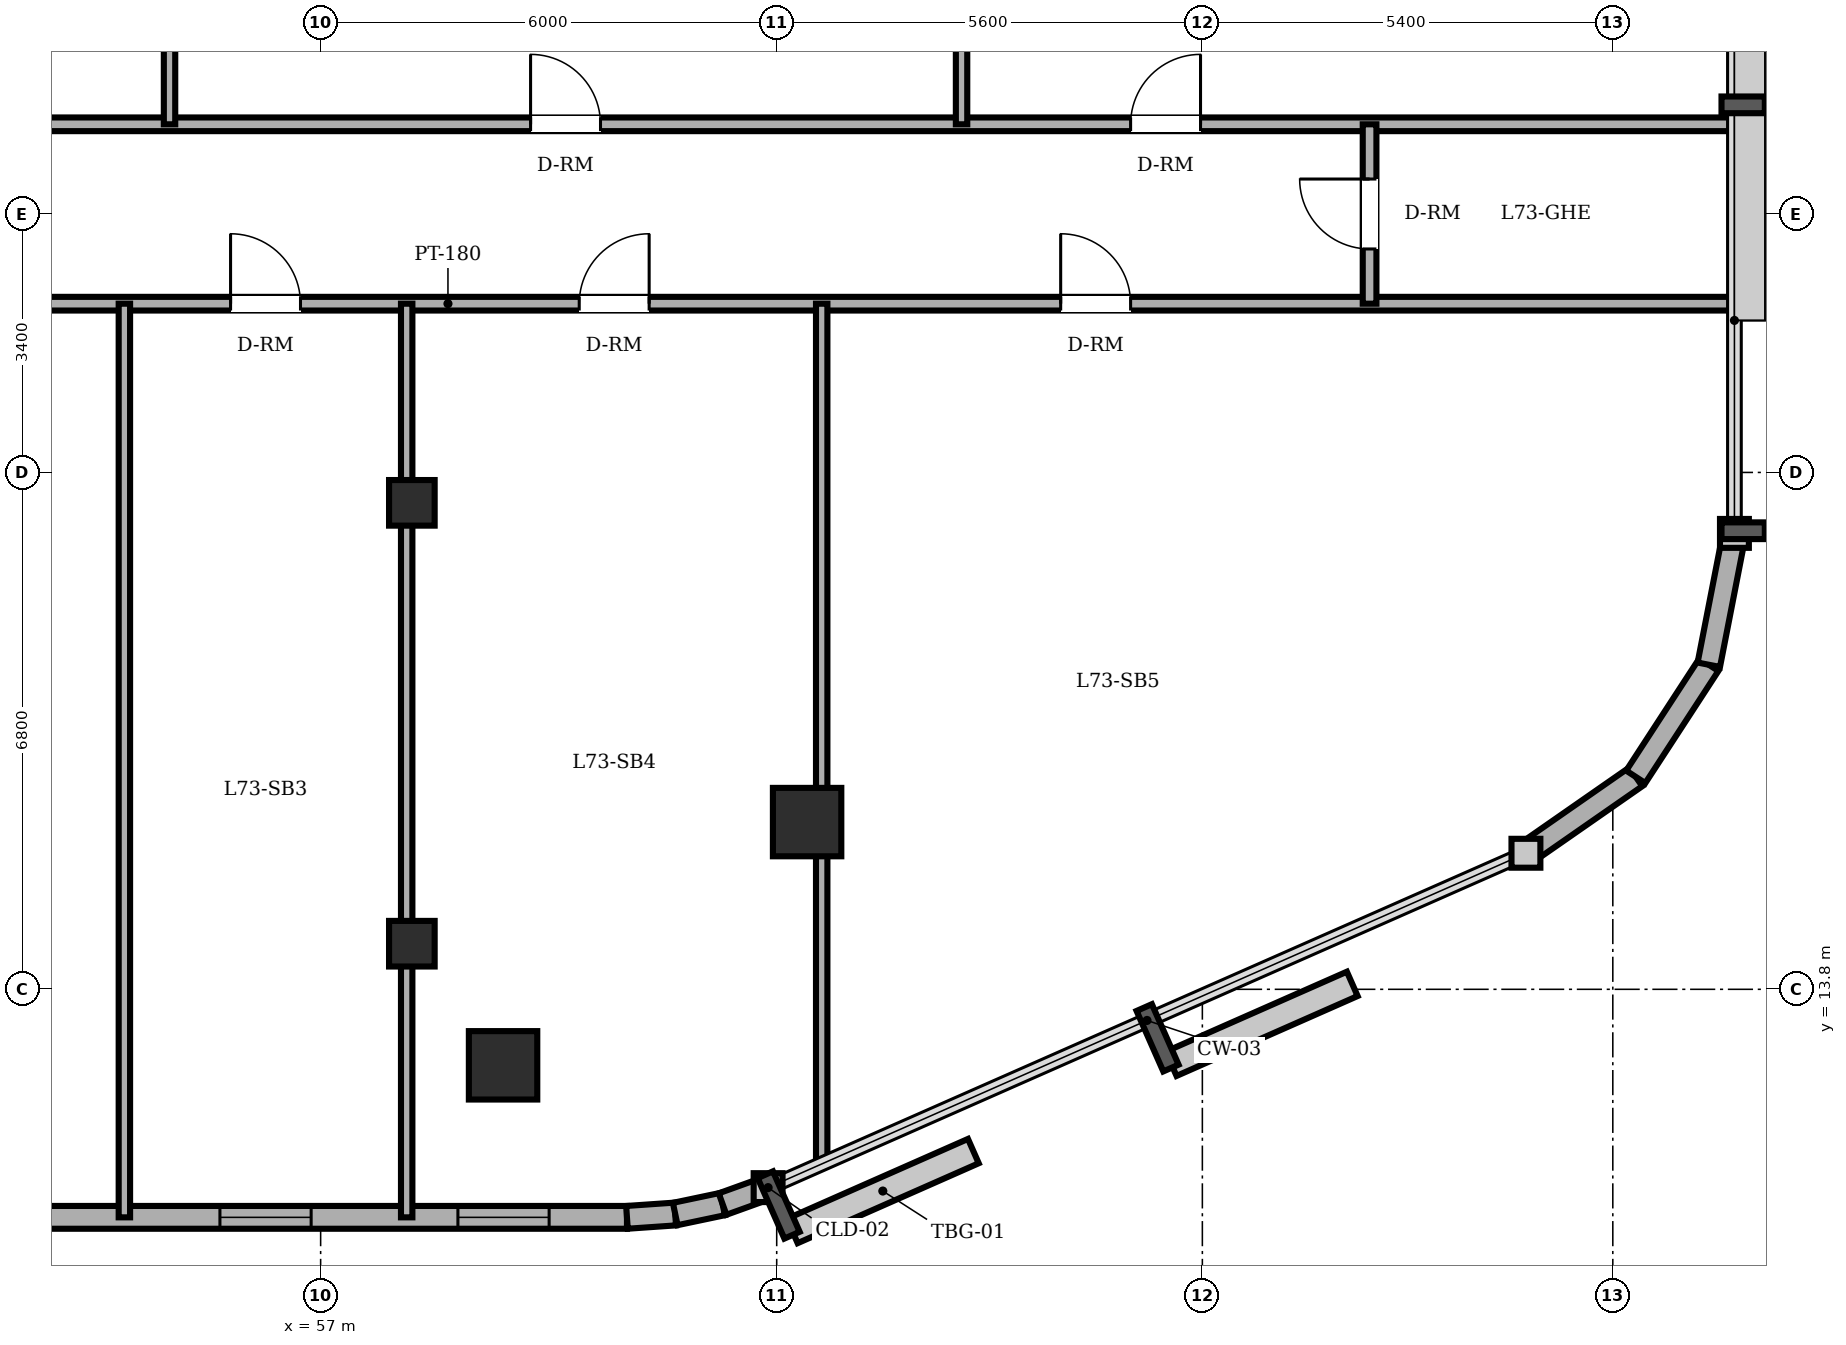
"""IFC4 building model, lengths in metres.
Left out: names, types, materials, properties, quantities, classifications, styles, units other than length and angle.
Written with IfcOpenShell. Run it as: python <this file> out.ifc"""

import sys

from ifc_helpers import new_model, si_unit, direction, frame, frame_2d, origin, origin_2d, place, context, subcontext, project, spatial, rectangle, circle, extrude, element, fill, save


model = new_model("IFC4")
c1 = context("Model", 3, precision=1e-05, world=origin(), true_north=direction((0.0, 1.0)))
c2 = subcontext(c1, "Body", "Model", "MODEL_VIEW")
j1 = project(units=[si_unit("LENGTHUNIT", "METRE"), si_unit("PLANEANGLEUNIT", "RADIAN")], contexts=[c1])
p1 = place(None, origin())
s1 = spatial("IfcSite", under=j1, at=p1, CompositionType="ELEMENT")
p2 = place(p1, origin())
s2 = spatial("IfcBuilding", under=s1, at=p2, CompositionType="ELEMENT")
p3 = place(p2, frame((0.0, 0.0, 280.7)))
s3 = spatial("IfcBuildingStorey", under=s2, at=p3, CompositionType="ELEMENT", Elevation=280.7)
for number, where, z_axis, x_axis in (
    (1, (59.4, 12.8, 0.0), (0.0, 0.0, 1.0), (1.0, 0.0, 0.0)),
    (2, (63.4, 16.0, 0.0), (0.0, 0.0, 1.0), (1.0, 0.0, 0.0)),
):
    element("IfcColumn", number, at=place(p3, frame(where, z_axis=z_axis, x_axis=x_axis)), inside=s3, PredefinedType="COLUMN", context=c2, shape_type="SweptSolid", body=[
        extrude(circle(Radius=0.45, at=origin_2d()), origin(), (0.0, 0.0, 1.0), 3.65),
    ])
for number, where, z_axis, x_axis in (
    (3, (58.2, 14.4, 0.0), (0.0, 0.0, 1.0), (1.0, 0.0, 0.0)),
    (4, (58.2, 20.2, 0.0), (0.0, 0.0, 1.0), (1.0, 0.0, 0.0)),
):
    element("IfcColumn", number, at=place(p3, frame(where, z_axis=z_axis, x_axis=x_axis)), inside=s3, PredefinedType="COLUMN", context=c2, shape_type="SweptSolid", body=[
        extrude(rectangle(XDim=0.6, YDim=0.6, at=origin_2d()), origin(), (0.0, 0.0, 1.0), 3.65),
    ])
p4 = place(p3, frame((24.0, 10.8, 0.0), z_axis=(0.0, 0.0, 1.0), x_axis=(1.0, 0.0, 0.0)))
e5 = element("IfcWall", 5, at=p4, inside=s3, PredefinedType="SOLIDWALL", context=c2, shape_type="SweptSolid", body=[
    extrude(rectangle(XDim=37.03, YDim=0.3, at=frame_2d((18.515, 0.0))), origin(), (0.0, 0.0, 1.0), 3.45),
])
p5 = place(p4, frame((12.325, 0.0, 0.0)))
e6 = element("IfcOpeningElement", 6, at=p5, cuts=e5, PredefinedType="OPENING", context=c2, shape_type="SweptSolid", body=[
    extrude(rectangle(XDim=0.95, YDim=2.2, at=frame_2d((0.475, 1.1))), frame((0.0, 0.16, 0.0), z_axis=(0.0, -1.0, 0.0), x_axis=(1.0, 0.0, 0.0)), (0.0, 0.0, 1.0), 0.32),
])
p6 = place(p4, frame((5.55, 0.0, 0.85)))
e7 = element("IfcOpeningElement", 7, at=p6, cuts=e5, PredefinedType="OPENING", context=c2, shape_type="SweptSolid", body=[
    extrude(rectangle(XDim=1.2, YDim=1.6, at=frame_2d((0.6, 0.8))), frame((0.0, 0.16, 0.0), z_axis=(0.0, -1.0, 0.0), x_axis=(1.0, 0.0, 0.0)), (0.0, 0.0, 1.0), 0.32),
])
p7 = place(p4, frame((18.97, 0.0, 0.85)))
e8 = element("IfcOpeningElement", 8, at=p7, cuts=e5, PredefinedType="OPENING", context=c2, shape_type="SweptSolid", body=[
    extrude(rectangle(XDim=1.2, YDim=1.6, at=frame_2d((0.6, 0.8))), frame((0.0, 0.16, 0.0), z_axis=(0.0, -1.0, 0.0), x_axis=(1.0, 0.0, 0.0)), (0.0, 0.0, 1.0), 0.32),
])
p8 = place(p4, frame((20.791, 0.0, 0.85)))
e9 = element("IfcOpeningElement", 9, at=p8, cuts=e5, PredefinedType="OPENING", context=c2, shape_type="SweptSolid", body=[
    extrude(rectangle(XDim=1.2, YDim=1.6, at=frame_2d((0.6, 0.8))), frame((0.0, 0.16, 0.0), z_axis=(0.0, -1.0, 0.0), x_axis=(1.0, 0.0, 0.0)), (0.0, 0.0, 1.0), 0.32),
])
p9 = place(p4, frame((25.013, 0.0, 0.85)))
e10 = element("IfcOpeningElement", 10, at=p9, cuts=e5, PredefinedType="OPENING", context=c2, shape_type="SweptSolid", body=[
    extrude(rectangle(XDim=1.2, YDim=1.6, at=frame_2d((0.6, 0.8))), frame((0.0, 0.16, 0.0), z_axis=(0.0, -1.0, 0.0), x_axis=(1.0, 0.0, 0.0)), (0.0, 0.0, 1.0), 0.32),
])
p10 = place(p4, frame((27.416, 0.0, 0.85)))
e11 = element("IfcOpeningElement", 11, at=p10, cuts=e5, PredefinedType="OPENING", context=c2, shape_type="SweptSolid", body=[
    extrude(rectangle(XDim=1.2, YDim=1.6, at=frame_2d((0.6, 0.8))), frame((0.0, 0.16, 0.0), z_axis=(0.0, -1.0, 0.0), x_axis=(1.0, 0.0, 0.0)), (0.0, 0.0, 1.0), 0.32),
])
p11 = place(p4, frame((31.675, 0.0, 0.85)))
e12 = element("IfcOpeningElement", 12, at=p11, cuts=e5, PredefinedType="OPENING", context=c2, shape_type="SweptSolid", body=[
    extrude(rectangle(XDim=1.2, YDim=1.6, at=frame_2d((0.6, 0.8))), frame((0.0, 0.16, 0.0), z_axis=(0.0, -1.0, 0.0), x_axis=(1.0, 0.0, 0.0)), (0.0, 0.0, 1.0), 0.32),
])
p12 = place(p4, frame((34.806, 0.0, 0.85)))
e13 = element("IfcOpeningElement", 13, at=p12, cuts=e5, PredefinedType="OPENING", context=c2, shape_type="SweptSolid", body=[
    extrude(rectangle(XDim=1.2, YDim=1.6, at=frame_2d((0.6, 0.8))), frame((0.0, 0.16, 0.0), z_axis=(0.0, -1.0, 0.0), x_axis=(1.0, 0.0, 0.0)), (0.0, 0.0, 1.0), 0.32),
])
p13 = place(p3, frame((61.03, 10.8, 0.0), z_axis=(0.0, 0.0, 1.0), x_axis=(0.997613959688, 0.069039028352, 0.0)))
e14 = element("IfcWall", 14, at=p13, inside=s3, PredefinedType="SOLIDWALL", context=c2, shape_type="SweptSolid", body=[
    extrude(rectangle(XDim=0.636, YDim=0.3, at=frame_2d((0.318, 0.0))), origin(), (0.0, 0.0, 1.0), 3.45),
])
p14 = place(p3, frame((61.665, 10.844, 0.0), z_axis=(0.0, 0.0, 1.0), x_axis=(0.97857012251, 0.205913854149, 0.0)))
e15 = element("IfcWall", 15, at=p14, inside=s3, PredefinedType="SOLIDWALL", context=c2, shape_type="SweptSolid", body=[
    extrude(rectangle(XDim=0.637, YDim=0.3, at=frame_2d((0.318, 0.0))), origin(), (0.0, 0.0, 1.0), 3.45),
])
p15 = place(p3, frame((62.288, 10.975, 0.0), z_axis=(0.0, 0.0, 1.0), x_axis=(0.94077491148, 0.339031806665, 0.0)))
e16 = element("IfcWall", 16, at=p15, inside=s3, PredefinedType="SOLIDWALL", context=c2, shape_type="SweptSolid", body=[
    extrude(rectangle(XDim=0.636, YDim=0.3, at=frame_2d((0.318, 0.0))), origin(), (0.0, 0.0, 1.0), 3.45),
])
p16 = place(p3, frame((72.857, 15.59, 0.0), z_axis=(0.0, 0.0, 1.0), x_axis=(0.821006966142, 0.570918174124, 0.0)))
e17 = element("IfcWall", 17, at=p16, inside=s3, PredefinedType="SOLIDWALL", context=c2, shape_type="SweptSolid", body=[
    extrude(rectangle(XDim=1.76, YDim=0.3, at=frame_2d((0.88, 0.0))), origin(), (0.0, 0.0, 1.0), 3.45),
])
for number, where, z_axis, x_axis in (
    (18, (74.302, 16.595, 0.0), (0.0, 0.0, 1.0), (0.546, 0.838, 0.0)),
    (19, (75.263, 18.07, 0.0), (0.0, 0.0, 1.0), (0.192, 0.981, 0.0)),
):
    element("IfcWall", number, at=place(p3, frame(where, z_axis=z_axis, x_axis=x_axis)), inside=s3, PredefinedType="SOLIDWALL", context=c2, shape_type="SweptSolid", body=[
        extrude(rectangle(XDim=1.76, YDim=0.3, at=frame_2d((0.88, 0.0))), origin(), (0.0, 0.0, 1.0), 3.45),
    ])
p17 = place(p3, frame((41.75, 22.82, 0.0), z_axis=(0.0, 0.0, 1.0), x_axis=(1.0, 0.0, 0.0)))
e20 = element("IfcWall", 20, at=p17, inside=s3, PredefinedType="PARTITIONING", context=c2, shape_type="SweptSolid", body=[
    extrude(rectangle(XDim=33.85, YDim=0.18, at=frame_2d((16.925, 0.0))), origin(), (0.0, 0.0, 1.0), 3.45),
])
p18 = place(p17, frame((2.53, 0.0, 0.0)))
e21 = element("IfcOpeningElement", 21, at=p18, cuts=e20, PredefinedType="OPENING", context=c2, shape_type="SweptSolid", body=[
    extrude(rectangle(XDim=0.92, YDim=2.1, at=frame_2d((0.46, 1.05))), frame((0.0, 0.1, 0.0), z_axis=(0.0, -1.0, 0.0), x_axis=(1.0, 0.0, 0.0)), (0.0, 0.0, 1.0), 0.2),
])
p19 = place(p17, frame((8.604, 0.0, 0.0)))
e22 = element("IfcOpeningElement", 22, at=p19, cuts=e20, PredefinedType="OPENING", context=c2, shape_type="SweptSolid", body=[
    extrude(rectangle(XDim=0.92, YDim=2.1, at=frame_2d((0.46, 1.05))), frame((0.0, 0.1, 0.0), z_axis=(0.0, -1.0, 0.0), x_axis=(1.0, 0.0, 0.0)), (0.0, 0.0, 1.0), 0.2),
])
p20 = place(p17, frame((14.065, 0.0, 0.0)))
e23 = element("IfcOpeningElement", 23, at=p20, cuts=e20, PredefinedType="OPENING", context=c2, shape_type="SweptSolid", body=[
    extrude(rectangle(XDim=0.92, YDim=2.1, at=frame_2d((0.46, 1.05))), frame((0.0, 0.1, 0.0), z_axis=(0.0, -1.0, 0.0), x_axis=(1.0, 0.0, 0.0)), (0.0, 0.0, 1.0), 0.2),
])
p21 = place(p17, frame((18.652, 0.0, 0.0)))
e24 = element("IfcOpeningElement", 24, at=p21, cuts=e20, PredefinedType="OPENING", context=c2, shape_type="SweptSolid", body=[
    extrude(rectangle(XDim=0.92, YDim=2.1, at=frame_2d((0.46, 1.05))), frame((0.0, 0.1, 0.0), z_axis=(0.0, -1.0, 0.0), x_axis=(1.0, 0.0, 0.0)), (0.0, 0.0, 1.0), 0.2),
])
p22 = place(p17, frame((24.986, 0.0, 0.0)))
e25 = element("IfcOpeningElement", 25, at=p22, cuts=e20, PredefinedType="OPENING", context=c2, shape_type="SweptSolid", body=[
    extrude(rectangle(XDim=0.92, YDim=2.1, at=frame_2d((0.46, 1.05))), frame((0.0, 0.1, 0.0), z_axis=(0.0, -1.0, 0.0), x_axis=(1.0, 0.0, 0.0)), (0.0, 0.0, 1.0), 0.2),
])
p23 = place(p3, frame((41.75, 25.18, 0.0), z_axis=(0.0, 0.0, 1.0), x_axis=(1.0, 0.0, 0.0)))
e26 = element("IfcWall", 26, at=p23, inside=s3, PredefinedType="PARTITIONING", context=c2, shape_type="SweptSolid", body=[
    extrude(rectangle(XDim=33.85, YDim=0.18, at=frame_2d((16.925, 0.0))), origin(), (0.0, 0.0, 1.0), 3.45),
])
p24 = place(p23, frame((2.484, 0.0, 0.0)))
e27 = element("IfcOpeningElement", 27, at=p24, cuts=e26, PredefinedType="OPENING", context=c2, shape_type="SweptSolid", body=[
    extrude(rectangle(XDim=0.92, YDim=2.1, at=frame_2d((0.46, 1.05))), frame((0.0, 0.1, 0.0), z_axis=(0.0, -1.0, 0.0), x_axis=(1.0, 0.0, 0.0)), (0.0, 0.0, 1.0), 0.2),
])
p25 = place(p23, frame((8.855, 0.0, 0.0)))
e28 = element("IfcOpeningElement", 28, at=p25, cuts=e26, PredefinedType="OPENING", context=c2, shape_type="SweptSolid", body=[
    extrude(rectangle(XDim=0.92, YDim=2.1, at=frame_2d((0.46, 1.05))), frame((0.0, 0.1, 0.0), z_axis=(0.0, -1.0, 0.0), x_axis=(1.0, 0.0, 0.0)), (0.0, 0.0, 1.0), 0.2),
])
p26 = place(p23, frame((18.012, 0.0, 0.0)))
e29 = element("IfcOpeningElement", 29, at=p26, cuts=e26, PredefinedType="OPENING", context=c2, shape_type="SweptSolid", body=[
    extrude(rectangle(XDim=0.92, YDim=2.1, at=frame_2d((0.46, 1.05))), frame((0.0, 0.1, 0.0), z_axis=(0.0, -1.0, 0.0), x_axis=(1.0, 0.0, 0.0)), (0.0, 0.0, 1.0), 0.2),
])
p27 = place(p23, frame((25.906, 0.0, 0.0)))
e30 = element("IfcOpeningElement", 30, at=p27, cuts=e26, PredefinedType="OPENING", context=c2, shape_type="SweptSolid", body=[
    extrude(rectangle(XDim=0.92, YDim=2.1, at=frame_2d((0.46, 1.05))), frame((0.0, 0.1, 0.0), z_axis=(0.0, -1.0, 0.0), x_axis=(1.0, 0.0, 0.0)), (0.0, 0.0, 1.0), 0.2),
])
for number, where, z_axis, x_axis in (
    (31, (54.418, 10.8, 0.0), (0.0, 0.0, 1.0), (0.0, 1.0, 0.0)),
    (32, (55.012, 25.18, 0.0), (0.0, 0.0, 1.0), (0.0, 1.0, 0.0)),
):
    element("IfcWall", number, at=place(p3, frame(where, z_axis=z_axis, x_axis=x_axis)), inside=s3, PredefinedType="PARTITIONING", context=c2, shape_type="SweptSolid", body=[
        extrude(rectangle(XDim=12.02, YDim=0.15, at=frame_2d((6.01, 0.0))), origin(), (0.0, 0.0, 1.0), 3.45),
    ])
p28 = place(p3, frame((58.132, 10.8, 0.0), z_axis=(0.0, 0.0, 1.0), x_axis=(0.0, 1.0, 0.0)))
e33 = element("IfcWall", 33, at=p28, inside=s3, PredefinedType="PARTITIONING", context=c2, shape_type="SweptSolid", body=[
    extrude(rectangle(XDim=12.02, YDim=0.15, at=frame_2d((6.01, 0.0))), origin(), (0.0, 0.0, 1.0), 3.032),
])
p29 = place(p3, frame((63.592, 11.502, 0.0), z_axis=(0.0, 0.0, 1.0), x_axis=(0.0, 1.0, 0.0)))
e34 = element("IfcWall", 34, at=p29, inside=s3, PredefinedType="PARTITIONING", context=c2, shape_type="SweptSolid", body=[
    extrude(rectangle(XDim=11.318, YDim=0.15, at=frame_2d((5.659, 0.0))), origin(), (0.0, 0.0, 1.0), 2.932),
])
p30 = place(p3, frame((65.432, 25.18, 0.0), z_axis=(0.0, 0.0, 1.0), x_axis=(0.0, 1.0, 0.0)))
e35 = element("IfcWall", 35, at=p30, inside=s3, PredefinedType="PARTITIONING", context=c2, shape_type="SweptSolid", body=[
    extrude(rectangle(XDim=10.506, YDim=0.15, at=frame_2d((5.253, 0.0))), origin(), (0.0, 0.0, 1.0), 3.45),
])
p31 = place(p3, frame((70.8, 22.82, 0.0), z_axis=(0.0, 0.0, 1.0), x_axis=(0.0, 1.0, 0.0)))
e36 = element("IfcWall", 36, at=p31, inside=s3, PredefinedType="PARTITIONING", context=c2, shape_type="SweptSolid", body=[
    extrude(rectangle(XDim=2.36, YDim=0.18, at=frame_2d((1.18, 0.0))), origin(), (0.0, 0.0, 1.0), 3.45),
])
p32 = place(p31, frame((0.72, 0.0, 0.0)))
e37 = element("IfcOpeningElement", 37, at=p32, cuts=e36, PredefinedType="OPENING", context=c2, shape_type="SweptSolid", body=[
    extrude(rectangle(XDim=0.92, YDim=2.1, at=frame_2d((0.46, 1.05))), frame((0.0, 0.1, 0.0), z_axis=(0.0, -1.0, 0.0), x_axis=(1.0, 0.0, 0.0)), (0.0, 0.0, 1.0), 0.2),
])
p33 = place(p11, origin())
e38 = element("IfcWindow", 38, at=p33, inside=s3, PartitioningType="SINGLE_PANEL", PredefinedType="WINDOW", context=c2, shape_type="SweptSolid", body=[
    extrude(rectangle(XDim=1.2, YDim=1.6, at=frame_2d((0.6, 0.8))), frame((0.0, 0.03, 0.0), z_axis=(0.0, -1.0, 0.0), x_axis=(1.0, 0.0, 0.0)), (0.0, 0.0, 1.0), 0.06),
])
fill(e12, e38)
p34 = place(p12, origin())
e39 = element("IfcWindow", 39, at=p34, inside=s3, PartitioningType="SINGLE_PANEL", PredefinedType="WINDOW", context=c2, shape_type="SweptSolid", body=[
    extrude(rectangle(XDim=1.2, YDim=1.6, at=frame_2d((0.6, 0.8))), frame((0.0, 0.03, 0.0), z_axis=(0.0, -1.0, 0.0), x_axis=(1.0, 0.0, 0.0)), (0.0, 0.0, 1.0), 0.06),
])
fill(e13, e39)
p35 = place(p26, origin())
e40 = element("IfcDoor", 40, at=p35, inside=s3, OperationType="SINGLE_SWING_LEFT", PredefinedType="DOOR", context=c2, shape_type="SweptSolid", body=[
    extrude(rectangle(XDim=0.92, YDim=2.1, at=frame_2d((0.46, 1.05))), frame((0.0, 0.025, 0.0), z_axis=(0.0, -1.0, 0.0), x_axis=(1.0, 0.0, 0.0)), (0.0, 0.0, 1.0), 0.05),
])
fill(e29, e40)
p36 = place(p27, origin())
e41 = element("IfcDoor", 41, at=p36, inside=s3, OperationType="SINGLE_SWING_RIGHT", PredefinedType="DOOR", context=c2, shape_type="SweptSolid", body=[
    extrude(rectangle(XDim=0.92, YDim=2.1, at=frame_2d((0.46, 1.05))), frame((0.0, 0.025, 0.0), z_axis=(0.0, -1.0, 0.0), x_axis=(1.0, 0.0, 0.0)), (0.0, 0.0, 1.0), 0.05),
])
fill(e30, e41)
p37 = place(p20, origin())
e42 = element("IfcDoor", 42, at=p37, inside=s3, OperationType="SINGLE_SWING_LEFT", PredefinedType="DOOR", context=c2, shape_type="SweptSolid", body=[
    extrude(rectangle(XDim=0.92, YDim=2.1, at=frame_2d((0.46, 1.05))), frame((0.0, 0.025, 0.0), z_axis=(0.0, -1.0, 0.0), x_axis=(1.0, 0.0, 0.0)), (0.0, 0.0, 1.0), 0.05),
])
fill(e23, e42)
p38 = place(p21, origin())
e43 = element("IfcDoor", 43, at=p38, inside=s3, OperationType="SINGLE_SWING_RIGHT", PredefinedType="DOOR", context=c2, shape_type="SweptSolid", body=[
    extrude(rectangle(XDim=0.92, YDim=2.1, at=frame_2d((0.46, 1.05))), frame((0.0, 0.025, 0.0), z_axis=(0.0, -1.0, 0.0), x_axis=(1.0, 0.0, 0.0)), (0.0, 0.0, 1.0), 0.05),
])
fill(e24, e43)
p39 = place(p22, origin())
e44 = element("IfcDoor", 44, at=p39, inside=s3, OperationType="SINGLE_SWING_LEFT", PredefinedType="DOOR", context=c2, shape_type="SweptSolid", body=[
    extrude(rectangle(XDim=0.92, YDim=2.1, at=frame_2d((0.46, 1.05))), frame((0.0, 0.025, 0.0), z_axis=(0.0, -1.0, 0.0), x_axis=(1.0, 0.0, 0.0)), (0.0, 0.0, 1.0), 0.05),
])
fill(e25, e44)
p40 = place(p32, origin())
e45 = element("IfcDoor", 45, at=p40, inside=s3, OperationType="SINGLE_SWING_RIGHT", PredefinedType="DOOR", context=c2, shape_type="SweptSolid", body=[
    extrude(rectangle(XDim=0.92, YDim=2.1, at=frame_2d((0.46, 1.05))), frame((0.0, 0.025, 0.0), z_axis=(0.0, -1.0, 0.0), x_axis=(1.0, 0.0, 0.0)), (0.0, 0.0, 1.0), 0.05),
])
fill(e37, e45)
save(model, sys.argv[1])
